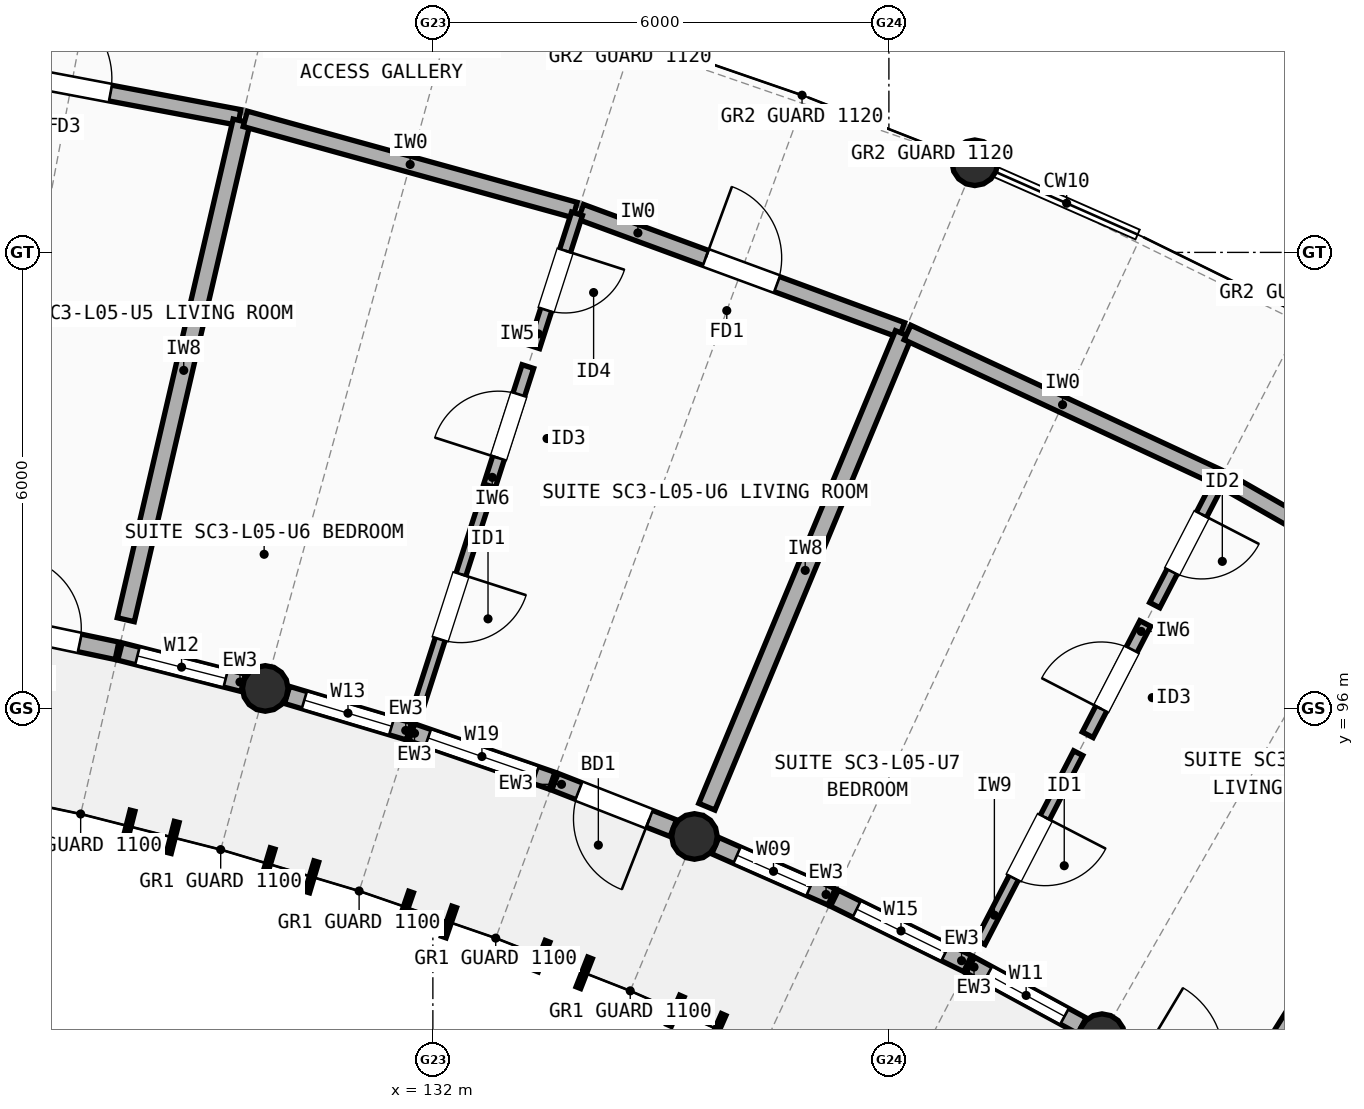
"""IFC4 building model, lengths in metres.
Left out: names, types, materials, properties, quantities, classifications, styles, units other than length and angle.
Written with IfcOpenShell. Run it as: python <this file> out.ifc"""

import sys

from ifc_helpers import new_model, si_unit, direction, frame, frame_2d, origin, origin_2d, place, context, subcontext, project, spatial, rectangle, circle, extrude, element, fill, save


model = new_model("IFC4")
c1 = context("Model", 3, precision=1e-05, world=origin(), true_north=direction((0.0, 1.0)))
c2 = subcontext(c1, "Body", "Model", "MODEL_VIEW")
j1 = project(units=[si_unit("LENGTHUNIT", "METRE"), si_unit("PLANEANGLEUNIT", "RADIAN")], contexts=[c1])
p1 = place(None, origin())
s1 = spatial("IfcSite", under=j1, at=p1, CompositionType="ELEMENT")
p2 = place(p1, origin())
s2 = spatial("IfcBuilding", under=s1, at=p2, CompositionType="ELEMENT")
p3 = place(p2, frame((0.0, 0.0, 17.3)))
s3 = spatial("IfcBuildingStorey", under=s2, at=p3, CompositionType="ELEMENT", Elevation=17.3)
for number, where, z_axis, x_axis in (
    (1, (129.795, 96.263, 0.0), (0.0, 0.0, 1.0), (1.0, 0.0, 0.0)),
    (2, (135.442, 94.316, 0.0), (0.0, 0.0, 1.0), (1.0, 0.0, 0.0)),
    (3, (139.13, 103.179, 0.0), (0.0, 0.0, 1.0), (1.0, 0.0, 0.0)),
    (4, (140.804, 91.682, 0.0), (0.0, 0.0, 1.0), (1.0, 0.0, 0.0)),
):
    element("IfcColumn", number, at=place(p3, frame(where, z_axis=z_axis, x_axis=x_axis)), inside=s3, PredefinedType="COLUMN", context=c2, shape_type="SweptSolid", body=[
        extrude(circle(Radius=0.3, at=origin_2d()), origin(), (0.0, 0.0, 1.0), 2.94),
    ])
p4 = place(p3, frame((125.934, 97.161, 0.0), z_axis=(0.0, 0.0, 1.0), x_axis=(0.978533860292, -0.206086108851, 0.0)))
e5 = element("IfcWall", 5, at=p4, inside=s3, PredefinedType="STANDARD", context=c2, shape_type="SweptSolid", body=[
    extrude(rectangle(XDim=1.952, YDim=0.235, at=frame_2d((0.976, 0.0))), origin(), (0.0, 0.0, 1.0), 2.676),
])
p5 = place(p4, frame((0.501, 0.0, 0.0)))
e6 = element("IfcOpeningElement", 6, at=p5, cuts=e5, PredefinedType="OPENING", context=c2, shape_type="SweptSolid", body=[
    extrude(rectangle(XDim=0.95, YDim=2.12, at=frame_2d((0.475, 1.06))), frame((0.0, 0.127, 0.0), z_axis=(0.0, -1.0, 0.0), x_axis=(1.0, 0.0, 0.0)), (0.0, 0.0, 1.0), 0.255),
])
p6 = place(p3, frame((127.883, 96.75, 0.0), z_axis=(0.0, 0.0, 1.0), x_axis=(0.969120648535, -0.246587040581, 0.0)))
e7 = element("IfcWall", 7, at=p6, inside=s3, PredefinedType="STANDARD", context=c2, shape_type="SweptSolid", body=[
    extrude(rectangle(XDim=1.672, YDim=0.235, at=frame_2d((0.836, 0.0))), origin(), (0.0, 0.0, 1.0), 2.676),
])
p7 = place(p6, frame((0.236, 0.0, 0.85)))
e8 = element("IfcOpeningElement", 8, at=p7, cuts=e7, PredefinedType="OPENING", context=c2, shape_type="SweptSolid", body=[
    extrude(rectangle(XDim=1.2, YDim=1.35, at=frame_2d((0.6, 0.675))), frame((0.0, 0.127, 0.0), z_axis=(0.0, -1.0, 0.0), x_axis=(1.0, 0.0, 0.0)), (0.0, 0.0, 1.0), 0.255),
])
p8 = place(p3, frame((130.082, 96.177, 0.0), z_axis=(0.0, 0.0, 1.0), x_axis=(0.958063008465, -0.286557623894, 0.0)))
e9 = element("IfcWall", 9, at=p8, inside=s3, PredefinedType="STANDARD", context=c2, shape_type="SweptSolid", body=[
    extrude(rectangle(XDim=1.672, YDim=0.235, at=frame_2d((0.836, 0.0))), origin(), (0.0, 0.0, 1.0), 2.676),
])
p9 = place(p8, frame((0.236, 0.0, 0.85)))
e10 = element("IfcOpeningElement", 10, at=p9, cuts=e9, PredefinedType="OPENING", context=c2, shape_type="SweptSolid", body=[
    extrude(rectangle(XDim=1.2, YDim=1.45, at=frame_2d((0.6, 0.725))), frame((0.0, 0.127, 0.0), z_axis=(0.0, -1.0, 0.0), x_axis=(1.0, 0.0, 0.0)), (0.0, 0.0, 1.0), 0.255),
])
p10 = place(p3, frame((131.722, 95.686, 0.0), z_axis=(0.0, 0.0, 1.0), x_axis=(0.945368994877, -0.326002244662, 0.0)))
e11 = element("IfcWall", 11, at=p10, inside=s3, PredefinedType="STANDARD", context=c2, shape_type="SweptSolid", body=[
    extrude(rectangle(XDim=1.952, YDim=0.235, at=frame_2d((0.976, 0.0))), origin(), (0.0, 0.0, 1.0), 2.676),
])
p11 = place(p10, frame((0.226, 0.0, 0.85)))
e12 = element("IfcOpeningElement", 12, at=p11, cuts=e11, PredefinedType="OPENING", context=c2, shape_type="SweptSolid", body=[
    extrude(rectangle(XDim=1.5, YDim=1.5, at=frame_2d((0.75, 0.75))), frame((0.0, 0.127, 0.0), z_axis=(0.0, -1.0, 0.0), x_axis=(1.0, 0.0, 0.0)), (0.0, 0.0, 1.0), 0.255),
])
p12 = place(p3, frame((133.606, 95.036, 0.0), z_axis=(0.0, 0.0, 1.0), x_axis=(0.931012112308, -0.364988283012, 0.0)))
e13 = element("IfcWall", 13, at=p12, inside=s3, PredefinedType="STANDARD", context=c2, shape_type="SweptSolid", body=[
    extrude(rectangle(XDim=1.672, YDim=0.235, at=frame_2d((0.836, 0.0))), origin(), (0.0, 0.0, 1.0), 2.676),
])
p13 = place(p12, frame((0.336, 0.0, 0.0)))
e14 = element("IfcOpeningElement", 14, at=p13, cuts=e13, PredefinedType="OPENING", context=c2, shape_type="SweptSolid", body=[
    extrude(rectangle(XDim=1.0, YDim=2.15, at=frame_2d((0.5, 1.075))), frame((0.0, 0.127, 0.0), z_axis=(0.0, -1.0, 0.0), x_axis=(1.0, 0.0, 0.0)), (0.0, 0.0, 1.0), 0.255),
])
p14 = place(p3, frame((135.717, 94.195, 0.0), z_axis=(0.0, 0.0, 1.0), x_axis=(0.915095317091, -0.403237598246, 0.0)))
e15 = element("IfcWall", 15, at=p14, inside=s3, PredefinedType="STANDARD", context=c2, shape_type="SweptSolid", body=[
    extrude(rectangle(XDim=1.672, YDim=0.235, at=frame_2d((0.836, 0.0))), origin(), (0.0, 0.0, 1.0), 2.676),
])
p15 = place(p14, frame((0.311, 0.0, 0.85)))
e16 = element("IfcOpeningElement", 16, at=p15, cuts=e15, PredefinedType="OPENING", context=c2, shape_type="SweptSolid", body=[
    extrude(rectangle(XDim=1.05, YDim=1.35, at=frame_2d((0.525, 0.675))), frame((0.0, 0.127, 0.0), z_axis=(0.0, -1.0, 0.0), x_axis=(1.0, 0.0, 0.0)), (0.0, 0.0, 1.0), 0.255),
])
p16 = place(p3, frame((137.283, 93.503, 0.0), z_axis=(0.0, 0.0, 1.0), x_axis=(0.897531751182, -0.44094983345, 0.0)))
e17 = element("IfcWall", 17, at=p16, inside=s3, PredefinedType="STANDARD", context=c2, shape_type="SweptSolid", body=[
    extrude(rectangle(XDim=1.952, YDim=0.235, at=frame_2d((0.976, 0.0))), origin(), (0.0, 0.0, 1.0), 2.676),
])
p17 = place(p16, frame((0.326, 0.0, 0.85)))
e18 = element("IfcOpeningElement", 18, at=p17, cuts=e17, PredefinedType="OPENING", context=c2, shape_type="SweptSolid", body=[
    extrude(rectangle(XDim=1.3, YDim=1.45, at=frame_2d((0.65, 0.725))), frame((0.0, 0.127, 0.0), z_axis=(0.0, -1.0, 0.0), x_axis=(1.0, 0.0, 0.0)), (0.0, 0.0, 1.0), 0.255),
])
p18 = place(p3, frame((139.071, 92.624, 0.0), z_axis=(0.0, 0.0, 1.0), x_axis=(0.878447349235, -0.477839151412, 0.0)))
e19 = element("IfcWall", 19, at=p18, inside=s3, PredefinedType="STANDARD", context=c2, shape_type="SweptSolid", body=[
    extrude(rectangle(XDim=1.672, YDim=0.235, at=frame_2d((0.836, 0.0))), origin(), (0.0, 0.0, 1.0), 2.676),
])
p19 = place(p18, frame((0.261, 0.0, 0.85)))
e20 = element("IfcOpeningElement", 20, at=p19, cuts=e19, PredefinedType="OPENING", context=c2, shape_type="SweptSolid", body=[
    extrude(rectangle(XDim=1.15, YDim=1.45, at=frame_2d((0.575, 0.725))), frame((0.0, 0.127, 0.0), z_axis=(0.0, -1.0, 0.0), x_axis=(1.0, 0.0, 0.0)), (0.0, 0.0, 1.0), 0.255),
])
p20 = place(p3, frame((125.031, 104.611, 0.0), z_axis=(0.0, 0.0, 1.0), x_axis=(0.982595404078, -0.18575863879, 0.0)))
e21 = element("IfcWall", 21, at=p20, inside=s3, PredefinedType="SOLIDWALL", context=c2, shape_type="SweptSolid", body=[
    extrude(rectangle(XDim=4.501, YDim=0.21, at=frame_2d((2.251, 0.0))), origin(), (0.0, 0.0, 1.0), 2.754),
])
p21 = place(p20, frame((1.726, 0.0, 0.0)))
e22 = element("IfcOpeningElement", 22, at=p21, cuts=e21, PredefinedType="OPENING", context=c2, shape_type="SweptSolid", body=[
    extrude(rectangle(XDim=1.05, YDim=2.15, at=frame_2d((0.525, 1.075))), frame((0.0, 0.115, 0.0), z_axis=(0.0, -1.0, 0.0), x_axis=(1.0, 0.0, 0.0)), (0.0, 0.0, 1.0), 0.23),
])
p22 = place(p3, frame((127.96, 97.167, 0.0), z_axis=(0.0, 0.0, 1.0), x_axis=(0.226349561734, 0.974046136434, 0.0)))
e23 = element("IfcWall", 23, at=p22, inside=s3, PredefinedType="SOLIDWALL", context=c2, shape_type="SweptSolid", body=[
    extrude(rectangle(XDim=6.736, YDim=0.23, at=frame_2d((3.368, 0.0))), origin(), (0.0, 0.0, 1.0), 2.714),
])
p23 = place(p3, frame((129.532, 103.757, 0.0), z_axis=(0.0, 0.0, 1.0), x_axis=(0.963830390038, -0.266516377055, 0.0)))
e24 = element("IfcWall", 24, at=p23, inside=s3, PredefinedType="SOLIDWALL", context=c2, shape_type="SweptSolid", body=[
    extrude(rectangle(XDim=4.501, YDim=0.21, at=frame_2d((2.251, 0.0))), origin(), (0.0, 0.0, 1.0), 2.734),
])
p24 = place(p3, frame((133.947, 102.533, 0.0), z_axis=(0.0, 0.0, 1.0), x_axis=(0.93839218154, -0.345572154006, 0.0)))
e25 = element("IfcWall", 25, at=p24, inside=s3, PredefinedType="SOLIDWALL", context=c2, shape_type="SweptSolid", body=[
    extrude(rectangle(XDim=4.502, YDim=0.21, at=frame_2d((2.251, 0.0))), origin(), (0.0, 0.0, 1.0), 2.714),
])
p25 = place(p24, frame((1.751, 0.0, 0.0)))
e26 = element("IfcOpeningElement", 26, at=p25, cuts=e25, PredefinedType="OPENING", context=c2, shape_type="SweptSolid", body=[
    extrude(rectangle(XDim=1.0, YDim=2.15, at=frame_2d((0.5, 1.075))), frame((0.0, 0.115, 0.0), z_axis=(0.0, -1.0, 0.0), x_axis=(1.0, 0.0, 0.0)), (0.0, 0.0, 1.0), 0.23),
])
p26 = place(p3, frame((131.804, 96.005, 0.0), z_axis=(0.0, 0.0, 1.0), x_axis=(0.306243449584, 0.951953228676, 0.0)))
e27 = element("IfcWall", 27, at=p26, inside=s3, PredefinedType="PARTITIONING", context=c2, shape_type="SweptSolid", body=[
    extrude(rectangle(XDim=2.8, YDim=0.135, at=frame_2d((1.4, 0.0))), origin(), (0.0, 0.0, 1.0), 2.754),
])
p27 = place(p26, frame((0.95, 0.0, 0.0)))
e28 = element("IfcOpeningElement", 28, at=p27, cuts=e27, PredefinedType="OPENING", context=c2, shape_type="SweptSolid", body=[
    extrude(rectangle(XDim=0.9, YDim=2.1, at=frame_2d((0.45, 1.05))), frame((0.0, 0.077, 0.0), z_axis=(0.0, -1.0, 0.0), x_axis=(1.0, 0.0, 0.0)), (0.0, 0.0, 1.0), 0.155),
])
p28 = place(p3, frame((132.745, 98.929, 0.0), z_axis=(0.0, 0.0, 1.0), x_axis=(0.306388026226, 0.95190670624, 0.0)))
e29 = element("IfcWall", 29, at=p28, inside=s3, PredefinedType="PLUMBINGWALL", context=c2, shape_type="SweptSolid", body=[
    extrude(rectangle(XDim=1.648, YDim=0.16, at=frame_2d((0.824, 0.0))), origin(), (0.0, 0.0, 1.0), 2.754),
])
p29 = place(p28, frame((0.384, 0.0, 0.0)))
e30 = element("IfcOpeningElement", 30, at=p29, cuts=e29, PredefinedType="OPENING", context=c2, shape_type="SweptSolid", body=[
    extrude(rectangle(XDim=0.88, YDim=2.1, at=frame_2d((0.44, 1.05))), frame((0.0, 0.09, 0.0), z_axis=(0.0, -1.0, 0.0), x_axis=(1.0, 0.0, 0.0)), (0.0, 0.0, 1.0), 0.18),
])
p30 = place(p3, frame((133.333, 100.757, 0.0), z_axis=(0.0, 0.0, 1.0), x_axis=(0.306258297612, 0.951948451936, 0.0)))
e31 = element("IfcWall", 31, at=p30, inside=s3, PredefinedType="PARTITIONING", context=c2, shape_type="SweptSolid", body=[
    extrude(rectangle(XDim=1.84, YDim=0.15, at=frame_2d((0.92, 0.0))), origin(), (0.0, 0.0, 1.0), 2.754),
])
p31 = place(p30, frame((0.51, 0.0, 0.0)))
e32 = element("IfcOpeningElement", 32, at=p31, cuts=e31, PredefinedType="OPENING", context=c2, shape_type="SweptSolid", body=[
    extrude(rectangle(XDim=0.82, YDim=2.08, at=frame_2d((0.41, 1.04))), frame((0.0, 0.085, 0.0), z_axis=(0.0, -1.0, 0.0), x_axis=(1.0, 0.0, 0.0)), (0.0, 0.0, 1.0), 0.17),
])
p32 = place(p3, frame((135.605, 94.707, 0.0), z_axis=(0.0, 0.0, 1.0), x_axis=(0.384190705314, 0.923253758157, 0.0)))
e33 = element("IfcWall", 33, at=p32, inside=s3, PredefinedType="SOLIDWALL", context=c2, shape_type="SweptSolid", body=[
    extrude(rectangle(XDim=6.736, YDim=0.23, at=frame_2d((3.368, 0.0))), origin(), (0.0, 0.0, 1.0), 2.734),
])
p33 = place(p3, frame((138.245, 100.946, 0.0), z_axis=(0.0, 0.0, 1.0), x_axis=(0.906512639591, -0.422178675755, 0.0)))
e34 = element("IfcWall", 34, at=p33, inside=s3, PredefinedType="SOLIDWALL", context=c2, shape_type="SweptSolid", body=[
    extrude(rectangle(XDim=4.501, YDim=0.21, at=frame_2d((2.251, 0.0))), origin(), (0.0, 0.0, 1.0), 2.754),
])
p34 = place(p3, frame((142.396, 99.009, 0.0), z_axis=(0.0, 0.0, 1.0), x_axis=(0.868376606973, -0.495905301909, 0.0)))
e35 = element("IfcWall", 35, at=p34, inside=s3, PredefinedType="SOLIDWALL", context=c2, shape_type="SweptSolid", body=[
    extrude(rectangle(XDim=4.502, YDim=0.21, at=frame_2d((2.251, 0.0))), origin(), (0.0, 0.0, 1.0), 2.734),
])
p35 = place(p34, frame((1.761, 0.0, 0.0)))
e36 = element("IfcOpeningElement", 36, at=p35, cuts=e35, PredefinedType="OPENING", context=c2, shape_type="SweptSolid", body=[
    extrude(rectangle(XDim=0.98, YDim=2.15, at=frame_2d((0.49, 1.075))), frame((0.0, 0.115, 0.0), z_axis=(0.0, -1.0, 0.0), x_axis=(1.0, 0.0, 0.0)), (0.0, 0.0, 1.0), 0.23),
])
p36 = place(p3, frame((139.204, 92.925, 0.0), z_axis=(0.0, 0.0, 1.0), x_axis=(0.459449012792, 0.888204145816, 0.0)))
e37 = element("IfcWall", 37, at=p36, inside=s3, PredefinedType="PARTITIONING", context=c2, shape_type="SweptSolid", body=[
    extrude(rectangle(XDim=2.8, YDim=0.135, at=frame_2d((1.4, 0.0))), origin(), (0.0, 0.0, 1.0), 2.714),
])
p37 = place(p36, frame((0.95, 0.0, 0.0)))
e38 = element("IfcOpeningElement", 38, at=p37, cuts=e37, PredefinedType="OPENING", context=c2, shape_type="SweptSolid", body=[
    extrude(rectangle(XDim=0.9, YDim=2.1, at=frame_2d((0.45, 1.05))), frame((0.0, 0.077, 0.0), z_axis=(0.0, -1.0, 0.0), x_axis=(1.0, 0.0, 0.0)), (0.0, 0.0, 1.0), 0.155),
])
p38 = place(p3, frame((140.615, 95.654, 0.0), z_axis=(0.0, 0.0, 1.0), x_axis=(0.459495453195, 0.888180121649, 0.0)))
e39 = element("IfcWall", 39, at=p38, inside=s3, PredefinedType="PLUMBINGWALL", context=c2, shape_type="SweptSolid", body=[
    extrude(rectangle(XDim=1.648, YDim=0.16, at=frame_2d((0.824, 0.0))), origin(), (0.0, 0.0, 1.0), 2.714),
])
p39 = place(p38, frame((0.384, 0.0, 0.0)))
e40 = element("IfcOpeningElement", 40, at=p39, cuts=e39, PredefinedType="OPENING", context=c2, shape_type="SweptSolid", body=[
    extrude(rectangle(XDim=0.88, YDim=2.1, at=frame_2d((0.44, 1.05))), frame((0.0, 0.09, 0.0), z_axis=(0.0, -1.0, 0.0), x_axis=(1.0, 0.0, 0.0)), (0.0, 0.0, 1.0), 0.18),
])
p40 = place(p3, frame((141.498, 97.359, 0.0), z_axis=(0.0, 0.0, 1.0), x_axis=(0.459379600499, 0.888240047873, 0.0)))
e41 = element("IfcWall", 41, at=p40, inside=s3, PredefinedType="PARTITIONING", context=c2, shape_type="SweptSolid", body=[
    extrude(rectangle(XDim=1.84, YDim=0.15, at=frame_2d((0.92, 0.0))), origin(), (0.0, 0.0, 1.0), 2.714),
])
p41 = place(p40, frame((0.495, 0.0, 0.0)))
e42 = element("IfcOpeningElement", 42, at=p41, cuts=e41, PredefinedType="OPENING", context=c2, shape_type="SweptSolid", body=[
    extrude(rectangle(XDim=0.85, YDim=2.1, at=frame_2d((0.425, 1.05))), frame((0.0, 0.085, 0.0), z_axis=(0.0, -1.0, 0.0), x_axis=(1.0, 0.0, 0.0)), (0.0, 0.0, 1.0), 0.17),
])
p42 = place(p3, frame((142.738, 91.017, 0.0), z_axis=(0.0, 0.0, 1.0), x_axis=(0.531512997039, 0.847050136638, 0.0)))
e43 = element("IfcWall", 43, at=p42, inside=s3, PredefinedType="SOLIDWALL", context=c2, shape_type="SweptSolid", body=[
    extrude(rectangle(XDim=6.736, YDim=0.23, at=frame_2d((3.368, 0.0))), origin(), (0.0, 0.0, 1.0), 2.754),
])
p43 = place(p5, frame((0.95, 0.0, 0.0), z_axis=(0.0, 0.0, 1.0), x_axis=(-1.0, 0.0, 0.0)))
e44 = element("IfcDoor", 44, at=p43, inside=s3, OperationType="SINGLE_SWING_LEFT", PredefinedType="DOOR", context=c2, shape_type="SweptSolid", body=[
    extrude(rectangle(XDim=0.95, YDim=2.12, at=frame_2d((0.475, 1.06))), frame((0.0, 0.025, 0.0), z_axis=(0.0, -1.0, 0.0), x_axis=(1.0, 0.0, 0.0)), (0.0, 0.0, 1.0), 0.05),
])
fill(e6, e44)
p44 = place(p7, origin())
e45 = element("IfcWindow", 45, at=p44, inside=s3, PartitioningType="SINGLE_PANEL", PredefinedType="WINDOW", context=c2, shape_type="SweptSolid", body=[
    extrude(rectangle(XDim=1.2, YDim=1.35, at=frame_2d((0.6, 0.675))), frame((0.0, 0.03, 0.0), z_axis=(0.0, -1.0, 0.0), x_axis=(1.0, 0.0, 0.0)), (0.0, 0.0, 1.0), 0.06),
])
fill(e8, e45)
p45 = place(p9, origin())
e46 = element("IfcWindow", 46, at=p45, inside=s3, PartitioningType="SINGLE_PANEL", PredefinedType="WINDOW", context=c2, shape_type="SweptSolid", body=[
    extrude(rectangle(XDim=1.2, YDim=1.45, at=frame_2d((0.6, 0.725))), frame((0.0, 0.03, 0.0), z_axis=(0.0, -1.0, 0.0), x_axis=(1.0, 0.0, 0.0)), (0.0, 0.0, 1.0), 0.06),
])
fill(e10, e46)
p46 = place(p11, origin())
e47 = element("IfcWindow", 47, at=p46, inside=s3, PartitioningType="SINGLE_PANEL", PredefinedType="WINDOW", context=c2, shape_type="SweptSolid", body=[
    extrude(rectangle(XDim=1.5, YDim=1.5, at=frame_2d((0.75, 0.75))), frame((0.0, 0.03, 0.0), z_axis=(0.0, -1.0, 0.0), x_axis=(1.0, 0.0, 0.0)), (0.0, 0.0, 1.0), 0.06),
])
fill(e12, e47)
p47 = place(p13, frame((1.0, 0.0, 0.0), z_axis=(0.0, 0.0, 1.0), x_axis=(-1.0, 0.0, 0.0)))
e48 = element("IfcDoor", 48, at=p47, inside=s3, OperationType="SINGLE_SWING_RIGHT", PredefinedType="DOOR", context=c2, shape_type="SweptSolid", body=[
    extrude(rectangle(XDim=1.0, YDim=2.15, at=frame_2d((0.5, 1.075))), frame((0.0, 0.025, 0.0), z_axis=(0.0, -1.0, 0.0), x_axis=(1.0, 0.0, 0.0)), (0.0, 0.0, 1.0), 0.05),
])
fill(e14, e48)
p48 = place(p15, origin())
e49 = element("IfcWindow", 49, at=p48, inside=s3, PartitioningType="SINGLE_PANEL", PredefinedType="WINDOW", context=c2, shape_type="SweptSolid", body=[
    extrude(rectangle(XDim=1.05, YDim=1.35, at=frame_2d((0.525, 0.675))), frame((0.0, 0.03, 0.0), z_axis=(0.0, -1.0, 0.0), x_axis=(1.0, 0.0, 0.0)), (0.0, 0.0, 1.0), 0.06),
])
fill(e16, e49)
p49 = place(p17, origin())
e50 = element("IfcWindow", 50, at=p49, inside=s3, PartitioningType="SINGLE_PANEL", PredefinedType="WINDOW", context=c2, shape_type="SweptSolid", body=[
    extrude(rectangle(XDim=1.3, YDim=1.45, at=frame_2d((0.65, 0.725))), frame((0.0, 0.03, 0.0), z_axis=(0.0, -1.0, 0.0), x_axis=(1.0, 0.0, 0.0)), (0.0, 0.0, 1.0), 0.06),
])
fill(e18, e50)
p50 = place(p19, origin())
e51 = element("IfcWindow", 51, at=p50, inside=s3, PartitioningType="SINGLE_PANEL", PredefinedType="WINDOW", context=c2, shape_type="SweptSolid", body=[
    extrude(rectangle(XDim=1.15, YDim=1.45, at=frame_2d((0.575, 0.725))), frame((0.0, 0.03, 0.0), z_axis=(0.0, -1.0, 0.0), x_axis=(1.0, 0.0, 0.0)), (0.0, 0.0, 1.0), 0.06),
])
fill(e20, e51)
p51 = place(p21, origin())
e52 = element("IfcDoor", 52, at=p51, inside=s3, OperationType="SINGLE_SWING_LEFT", PredefinedType="DOOR", context=c2, shape_type="SweptSolid", body=[
    extrude(rectangle(XDim=1.05, YDim=2.15, at=frame_2d((0.525, 1.075))), frame((0.0, 0.025, 0.0), z_axis=(0.0, -1.0, 0.0), x_axis=(1.0, 0.0, 0.0)), (0.0, 0.0, 1.0), 0.05),
])
fill(e22, e52)
p52 = place(p25, origin())
e53 = element("IfcDoor", 53, at=p52, inside=s3, OperationType="SINGLE_SWING_LEFT", PredefinedType="DOOR", context=c2, shape_type="SweptSolid", body=[
    extrude(rectangle(XDim=1.0, YDim=2.15, at=frame_2d((0.5, 1.075))), frame((0.0, 0.025, 0.0), z_axis=(0.0, -1.0, 0.0), x_axis=(1.0, 0.0, 0.0)), (0.0, 0.0, 1.0), 0.05),
])
fill(e26, e53)
p53 = place(p27, origin())
e54 = element("IfcDoor", 54, at=p53, inside=s3, OperationType="SINGLE_SWING_RIGHT", PredefinedType="DOOR", context=c2, shape_type="SweptSolid", body=[
    extrude(rectangle(XDim=0.9, YDim=2.1, at=frame_2d((0.45, 1.05))), frame((0.0, 0.025, 0.0), z_axis=(0.0, -1.0, 0.0), x_axis=(1.0, 0.0, 0.0)), (0.0, 0.0, 1.0), 0.05),
])
fill(e28, e54)
p54 = place(p29, origin())
e55 = element("IfcDoor", 55, at=p54, inside=s3, OperationType="SINGLE_SWING_LEFT", PredefinedType="DOOR", context=c2, shape_type="SweptSolid", body=[
    extrude(rectangle(XDim=0.88, YDim=2.1, at=frame_2d((0.44, 1.05))), frame((0.0, 0.025, 0.0), z_axis=(0.0, -1.0, 0.0), x_axis=(1.0, 0.0, 0.0)), (0.0, 0.0, 1.0), 0.05),
])
fill(e30, e55)
p55 = place(p31, origin())
e56 = element("IfcDoor", 56, at=p55, inside=s3, OperationType="SINGLE_SWING_RIGHT", PredefinedType="DOOR", context=c2, shape_type="SweptSolid", body=[
    extrude(rectangle(XDim=0.82, YDim=2.08, at=frame_2d((0.41, 1.04))), frame((0.0, 0.025, 0.0), z_axis=(0.0, -1.0, 0.0), x_axis=(1.0, 0.0, 0.0)), (0.0, 0.0, 1.0), 0.05),
])
fill(e32, e56)
p56 = place(p37, origin())
e57 = element("IfcDoor", 57, at=p56, inside=s3, OperationType="SINGLE_SWING_RIGHT", PredefinedType="DOOR", context=c2, shape_type="SweptSolid", body=[
    extrude(rectangle(XDim=0.9, YDim=2.1, at=frame_2d((0.45, 1.05))), frame((0.0, 0.025, 0.0), z_axis=(0.0, -1.0, 0.0), x_axis=(1.0, 0.0, 0.0)), (0.0, 0.0, 1.0), 0.05),
])
fill(e38, e57)
p57 = place(p39, origin())
e58 = element("IfcDoor", 58, at=p57, inside=s3, OperationType="SINGLE_SWING_LEFT", PredefinedType="DOOR", context=c2, shape_type="SweptSolid", body=[
    extrude(rectangle(XDim=0.88, YDim=2.1, at=frame_2d((0.44, 1.05))), frame((0.0, 0.025, 0.0), z_axis=(0.0, -1.0, 0.0), x_axis=(1.0, 0.0, 0.0)), (0.0, 0.0, 1.0), 0.05),
])
fill(e40, e58)
p58 = place(p41, origin())
e59 = element("IfcDoor", 59, at=p58, inside=s3, OperationType="SINGLE_SWING_RIGHT", PredefinedType="DOOR", context=c2, shape_type="SweptSolid", body=[
    extrude(rectangle(XDim=0.85, YDim=2.1, at=frame_2d((0.425, 1.05))), frame((0.0, 0.025, 0.0), z_axis=(0.0, -1.0, 0.0), x_axis=(1.0, 0.0, 0.0)), (0.0, 0.0, 1.0), 0.05),
])
fill(e42, e59)
save(model, sys.argv[1])
